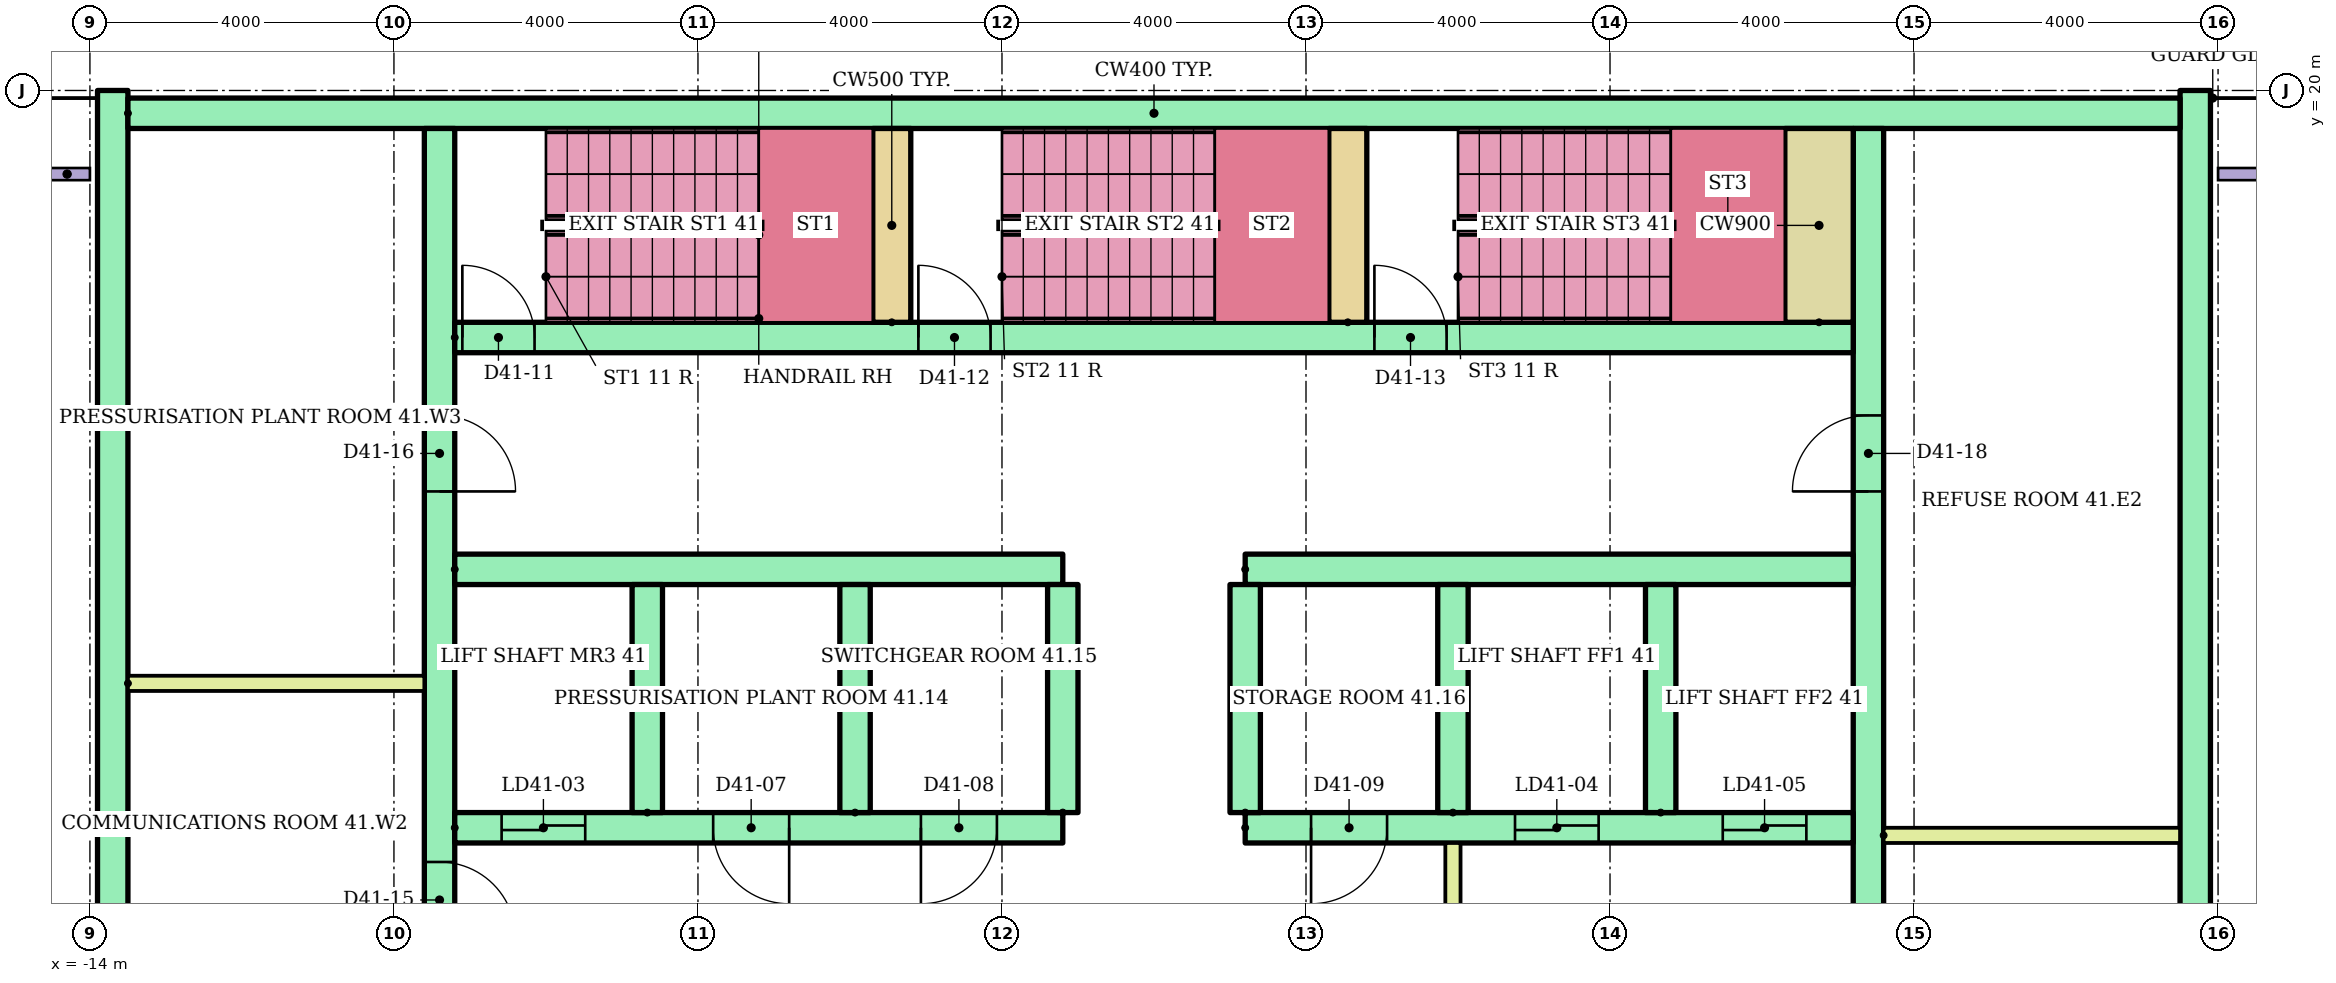
"""IFC4 building model, lengths in metres.
Left out: names, types, materials, properties, quantities, classifications, styles, units other than length and angle.
Written with IfcOpenShell. Run it as: python <this file> out.ifc"""

import sys

from ifc_helpers import new_model, si_unit, direction, frame, frame_2d, origin, place, context, subcontext, project, spatial, rectangle, extrude, element, fill, save


model = new_model("IFC4")
c1 = context("Model", 3, precision=1e-05, world=origin(), true_north=direction((0.0, 1.0)))
c2 = subcontext(c1, "Body", "Model", "MODEL_VIEW")
j1 = project(units=[si_unit("LENGTHUNIT", "METRE"), si_unit("PLANEANGLEUNIT", "RADIAN")], contexts=[c1])
p1 = place(None, origin())
s1 = spatial("IfcSite", under=j1, at=p1, CompositionType="ELEMENT")
p2 = place(p1, origin())
s2 = spatial("IfcBuilding", under=s1, at=p2, CompositionType="ELEMENT")
p3 = place(p2, frame((0.0, 0.0, 161.4)))
s3 = spatial("IfcBuildingStorey", under=s2, at=p3, CompositionType="ELEMENT", Elevation=161.4)
for number, where, z_axis, x_axis in (
    (1, (-13.7, 3.0, 0.0), (0.0, 0.0, 1.0), (0.0, 1.0, 0.0)),
    (2, (13.7, 3.0, 0.0), (0.0, 0.0, 1.0), (0.0, 1.0, 0.0)),
):
    element("IfcWall", number, at=place(p3, frame(where, z_axis=z_axis, x_axis=x_axis)), inside=s3, PredefinedType="SHEAR", context=c2, shape_type="SweptSolid", body=[
        extrude(rectangle(XDim=17.0, YDim=0.4, at=frame_2d((8.5, 0.0))), origin(), (0.0, 0.0, 1.0), 3.62),
    ])
p4 = place(p3, frame((-13.5, 19.7, 0.0)))
e3 = element("IfcWall", 3, at=p4, inside=s3, PredefinedType="SHEAR", context=c2, shape_type="SweptSolid", body=[
    extrude(rectangle(XDim=27.0, YDim=0.4, at=frame_2d((13.5, 0.0))), origin(), (0.0, 0.0, 1.0), 3.62),
])
p5 = place(p3, frame((-9.4, 6.8, 0.0), z_axis=(0.0, 0.0, 1.0), x_axis=(0.0, 1.0, 0.0)))
e4 = element("IfcWall", 4, at=p5, inside=s3, PredefinedType="SHEAR", context=c2, shape_type="SweptSolid", body=[
    extrude(rectangle(XDim=12.7, YDim=0.4, at=frame_2d((6.35, 0.0))), origin(), (0.0, 0.0, 1.0), 3.62),
])
p6 = place(p5, frame((0.3, 0.0, 0.0)))
e5 = element("IfcOpeningElement", 5, at=p6, cuts=e4, PredefinedType="OPENING", context=c2, shape_type="SweptSolid", body=[
    extrude(rectangle(XDim=1.0, YDim=2.1, at=frame_2d((0.5, 1.05))), frame((0.0, 0.21, 0.0), z_axis=(0.0, -1.0, 0.0), x_axis=(1.0, 0.0, 0.0)), (0.0, 0.0, 1.0), 0.42),
])
p7 = place(p5, frame((2.05, 0.0, 0.0)))
e6 = element("IfcOpeningElement", 6, at=p7, cuts=e4, PredefinedType="OPENING", context=c2, shape_type="SweptSolid", body=[
    extrude(rectangle(XDim=1.0, YDim=2.1, at=frame_2d((0.5, 1.05))), frame((0.0, 0.21, 0.0), z_axis=(0.0, -1.0, 0.0), x_axis=(1.0, 0.0, 0.0)), (0.0, 0.0, 1.0), 0.42),
])
p8 = place(p5, frame((7.925, 0.0, 0.0)))
e7 = element("IfcOpeningElement", 7, at=p8, cuts=e4, PredefinedType="OPENING", context=c2, shape_type="SweptSolid", body=[
    extrude(rectangle(XDim=1.0, YDim=2.1, at=frame_2d((0.5, 1.05))), frame((0.0, 0.21, 0.0), z_axis=(0.0, -1.0, 0.0), x_axis=(1.0, 0.0, 0.0)), (0.0, 0.0, 1.0), 0.42),
])
p9 = place(p3, frame((9.4, 6.8, 0.0), z_axis=(0.0, 0.0, 1.0), x_axis=(0.0, 1.0, 0.0)))
e8 = element("IfcWall", 8, at=p9, inside=s3, PredefinedType="SHEAR", context=c2, shape_type="SweptSolid", body=[
    extrude(rectangle(XDim=12.7, YDim=0.4, at=frame_2d((6.35, 0.0))), origin(), (0.0, 0.0, 1.0), 3.62),
])
p10 = place(p9, frame((1.15, 0.0, 0.0)))
e9 = element("IfcOpeningElement", 9, at=p10, cuts=e8, PredefinedType="OPENING", context=c2, shape_type="SweptSolid", body=[
    extrude(rectangle(XDim=1.0, YDim=2.1, at=frame_2d((0.5, 1.05))), frame((0.0, 0.21, 0.0), z_axis=(0.0, -1.0, 0.0), x_axis=(1.0, 0.0, 0.0)), (0.0, 0.0, 1.0), 0.42),
])
p11 = place(p9, frame((7.925, 0.0, 0.0)))
e10 = element("IfcOpeningElement", 10, at=p11, cuts=e8, PredefinedType="OPENING", context=c2, shape_type="SweptSolid", body=[
    extrude(rectangle(XDim=1.0, YDim=2.1, at=frame_2d((0.5, 1.05))), frame((0.0, 0.21, 0.0), z_axis=(0.0, -1.0, 0.0), x_axis=(1.0, 0.0, 0.0)), (0.0, 0.0, 1.0), 0.42),
])
p12 = place(p3, frame((-9.2, 10.3, 0.0)))
e11 = element("IfcWall", 11, at=p12, inside=s3, PredefinedType="SHEAR", context=c2, shape_type="SweptSolid", body=[
    extrude(rectangle(XDim=8.0, YDim=0.4, at=frame_2d((4.0, 0.0))), origin(), (0.0, 0.0, 1.0), 3.62),
])
p13 = place(p12, frame((0.617, 0.0, 0.0)))
e12 = element("IfcOpeningElement", 12, at=p13, cuts=e11, PredefinedType="OPENING", context=c2, shape_type="SweptSolid", body=[
    extrude(rectangle(XDim=1.1, YDim=2.1, at=frame_2d((0.55, 1.05))), frame((0.0, 0.21, 0.0), z_axis=(0.0, -1.0, 0.0), x_axis=(1.0, 0.0, 0.0)), (0.0, 0.0, 1.0), 0.42),
])
p14 = place(p12, frame((3.4, 0.0, 0.0)))
e13 = element("IfcOpeningElement", 13, at=p14, cuts=e11, PredefinedType="OPENING", context=c2, shape_type="SweptSolid", body=[
    extrude(rectangle(XDim=1.0, YDim=2.1, at=frame_2d((0.5, 1.05))), frame((0.0, 0.21, 0.0), z_axis=(0.0, -1.0, 0.0), x_axis=(1.0, 0.0, 0.0)), (0.0, 0.0, 1.0), 0.42),
])
p15 = place(p12, frame((6.133, 0.0, 0.0)))
e14 = element("IfcOpeningElement", 14, at=p15, cuts=e11, PredefinedType="OPENING", context=c2, shape_type="SweptSolid", body=[
    extrude(rectangle(XDim=1.0, YDim=2.1, at=frame_2d((0.5, 1.05))), frame((0.0, 0.21, 0.0), z_axis=(0.0, -1.0, 0.0), x_axis=(1.0, 0.0, 0.0)), (0.0, 0.0, 1.0), 0.42),
])
p16 = place(p3, frame((-9.2, 13.7, 0.0)))
e15 = element("IfcWall", 15, at=p16, inside=s3, PredefinedType="SHEAR", context=c2, shape_type="SweptSolid", body=[
    extrude(rectangle(XDim=8.0, YDim=0.4, at=frame_2d((4.0, 0.0))), origin(), (0.0, 0.0, 1.0), 3.62),
])
p17 = place(p3, frame((1.2, 10.3, 0.0)))
e16 = element("IfcWall", 16, at=p17, inside=s3, PredefinedType="SHEAR", context=c2, shape_type="SweptSolid", body=[
    extrude(rectangle(XDim=8.0, YDim=0.4, at=frame_2d((4.0, 0.0))), origin(), (0.0, 0.0, 1.0), 3.62),
])
p18 = place(p17, frame((3.55, 0.0, 0.0)))
e17 = element("IfcOpeningElement", 17, at=p18, cuts=e16, PredefinedType="OPENING", context=c2, shape_type="SweptSolid", body=[
    extrude(rectangle(XDim=1.1, YDim=2.1, at=frame_2d((0.55, 1.05))), frame((0.0, 0.21, 0.0), z_axis=(0.0, -1.0, 0.0), x_axis=(1.0, 0.0, 0.0)), (0.0, 0.0, 1.0), 0.42),
])
p19 = place(p17, frame((6.283, 0.0, 0.0)))
e18 = element("IfcOpeningElement", 18, at=p19, cuts=e16, PredefinedType="OPENING", context=c2, shape_type="SweptSolid", body=[
    extrude(rectangle(XDim=1.1, YDim=2.1, at=frame_2d((0.55, 1.05))), frame((0.0, 0.21, 0.0), z_axis=(0.0, -1.0, 0.0), x_axis=(1.0, 0.0, 0.0)), (0.0, 0.0, 1.0), 0.42),
])
p20 = place(p17, frame((0.867, 0.0, 0.0)))
e19 = element("IfcOpeningElement", 19, at=p20, cuts=e16, PredefinedType="OPENING", context=c2, shape_type="SweptSolid", body=[
    extrude(rectangle(XDim=1.0, YDim=2.1, at=frame_2d((0.5, 1.05))), frame((0.0, 0.21, 0.0), z_axis=(0.0, -1.0, 0.0), x_axis=(1.0, 0.0, 0.0)), (0.0, 0.0, 1.0), 0.42),
])
p21 = place(p3, frame((1.2, 13.7, 0.0)))
e20 = element("IfcWall", 20, at=p21, inside=s3, PredefinedType="SHEAR", context=c2, shape_type="SweptSolid", body=[
    extrude(rectangle(XDim=8.0, YDim=0.4, at=frame_2d((4.0, 0.0))), origin(), (0.0, 0.0, 1.0), 3.62),
])
for number, where, z_axis, x_axis in (
    (21, (-6.667, 10.5, 0.0), (0.0, 0.0, 1.0), (0.0, 1.0, 0.0)),
    (22, (-3.933, 10.5, 0.0), (0.0, 0.0, 1.0), (0.0, 1.0, 0.0)),
    (23, (-1.2, 10.5, 0.0), (0.0, 0.0, 1.0), (0.0, 1.0, 0.0)),
    (24, (1.2, 10.5, 0.0), (0.0, 0.0, 1.0), (0.0, 1.0, 0.0)),
    (25, (3.933, 10.5, 0.0), (0.0, 0.0, 1.0), (0.0, 1.0, 0.0)),
    (26, (6.667, 10.5, 0.0), (0.0, 0.0, 1.0), (0.0, 1.0, 0.0)),
):
    element("IfcWall", number, at=place(p3, frame(where, z_axis=z_axis, x_axis=x_axis)), inside=s3, PredefinedType="SHEAR", context=c2, shape_type="SweptSolid", body=[
        extrude(rectangle(XDim=3.0, YDim=0.4, at=frame_2d((1.5, 0.0))), origin(), (0.0, 0.0, 1.0), 3.62),
    ])
p22 = place(p3, frame((3.933, 6.8, 0.0), z_axis=(0.0, 0.0, 1.0), x_axis=(0.0, 1.0, 0.0)))
e27 = element("IfcWall", 27, at=p22, inside=s3, PredefinedType="PARTITIONING", context=c2, shape_type="SweptSolid", body=[
    extrude(rectangle(XDim=3.3, YDim=0.2, at=frame_2d((1.65, 0.0))), origin(), (0.0, 0.0, 1.0), 3.62),
])
p23 = place(p22, frame((1.1, 0.0, 0.0)))
e28 = element("IfcOpeningElement", 28, at=p23, cuts=e27, PredefinedType="OPENING", context=c2, shape_type="SweptSolid", body=[
    extrude(rectangle(XDim=1.1, YDim=2.1, at=frame_2d((0.55, 1.05))), frame((0.0, 0.11, 0.0), z_axis=(0.0, -1.0, 0.0), x_axis=(1.0, 0.0, 0.0)), (0.0, 0.0, 1.0), 0.22),
])
p24 = place(p3, frame((-9.2, 16.75, 0.0)))
e29 = element("IfcWall", 29, at=p24, inside=s3, PredefinedType="SHEAR", context=c2, shape_type="SweptSolid", body=[
    extrude(rectangle(XDim=18.4, YDim=0.4, at=frame_2d((9.2, 0.0))), origin(), (0.0, 0.0, 1.0), 3.62),
])
p25 = place(p24, frame((0.1, 0.0, 0.0)))
e30 = element("IfcOpeningElement", 30, at=p25, cuts=e29, PredefinedType="OPENING", context=c2, shape_type="SweptSolid", body=[
    extrude(rectangle(XDim=0.95, YDim=2.1, at=frame_2d((0.475, 1.05))), frame((0.0, 0.21, 0.0), z_axis=(0.0, -1.0, 0.0), x_axis=(1.0, 0.0, 0.0)), (0.0, 0.0, 1.0), 0.42),
])
p26 = place(p24, frame((6.1, 0.0, 0.0)))
e31 = element("IfcOpeningElement", 31, at=p26, cuts=e29, PredefinedType="OPENING", context=c2, shape_type="SweptSolid", body=[
    extrude(rectangle(XDim=0.95, YDim=2.1, at=frame_2d((0.475, 1.05))), frame((0.0, 0.21, 0.0), z_axis=(0.0, -1.0, 0.0), x_axis=(1.0, 0.0, 0.0)), (0.0, 0.0, 1.0), 0.42),
])
p27 = place(p24, frame((12.1, 0.0, 0.0)))
e32 = element("IfcOpeningElement", 32, at=p27, cuts=e29, PredefinedType="OPENING", context=c2, shape_type="SweptSolid", body=[
    extrude(rectangle(XDim=0.95, YDim=2.1, at=frame_2d((0.475, 1.05))), frame((0.0, 0.21, 0.0), z_axis=(0.0, -1.0, 0.0), x_axis=(1.0, 0.0, 0.0)), (0.0, 0.0, 1.0), 0.42),
])
for number, where, z_axis, x_axis in (
    (33, (-3.45, 16.95, 0.0), (0.0, 0.0, 1.0), (0.0, 1.0, 0.0)),
    (34, (2.55, 16.95, 0.0), (0.0, 0.0, 1.0), (0.0, 1.0, 0.0)),
):
    element("IfcWall", number, at=place(p3, frame(where, z_axis=z_axis, x_axis=x_axis)), inside=s3, PredefinedType="SHEAR", context=c2, shape_type="SweptSolid", body=[
        extrude(rectangle(XDim=2.55, YDim=0.5, at=frame_2d((1.275, 0.0))), origin(), (0.0, 0.0, 1.0), 3.62),
    ])
p28 = place(p3, frame((8.75, 16.95, 0.0), z_axis=(0.0, 0.0, 1.0), x_axis=(0.0, 1.0, 0.0)))
e35 = element("IfcWall", 35, at=p28, inside=s3, PredefinedType="SHEAR", context=c2, shape_type="SweptSolid", body=[
    extrude(rectangle(XDim=2.55, YDim=0.9, at=frame_2d((1.275, 0.0))), origin(), (0.0, 0.0, 1.0), 3.62),
])
for number, where in (
    (36, (-13.5, 12.2, 0.0)),
    (37, (9.6, 10.2, 0.0)),
):
    element("IfcWall", number, at=place(p3, frame(where)), inside=s3, PredefinedType="PARTITIONING", context=c2, shape_type="SweptSolid", body=[
        extrude(rectangle(XDim=3.9, YDim=0.2, at=frame_2d((1.95, 0.0))), origin(), (0.0, 0.0, 1.0), 3.62),
    ])
p29 = place(p13, origin())
e38 = element("IfcDoor", 38, at=p29, inside=s3, OperationType="SLIDING_TO_LEFT", PredefinedType="DOOR", context=c2, shape_type="SweptSolid", body=[
    extrude(rectangle(XDim=1.1, YDim=2.1, at=frame_2d((0.55, 1.05))), frame((0.0, 0.025, 0.0), z_axis=(0.0, -1.0, 0.0), x_axis=(1.0, 0.0, 0.0)), (0.0, 0.0, 1.0), 0.05),
])
fill(e12, e38)
p30 = place(p18, origin())
e39 = element("IfcDoor", 39, at=p30, inside=s3, OperationType="SLIDING_TO_LEFT", PredefinedType="DOOR", context=c2, shape_type="SweptSolid", body=[
    extrude(rectangle(XDim=1.1, YDim=2.1, at=frame_2d((0.55, 1.05))), frame((0.0, 0.025, 0.0), z_axis=(0.0, -1.0, 0.0), x_axis=(1.0, 0.0, 0.0)), (0.0, 0.0, 1.0), 0.05),
])
fill(e17, e39)
p31 = place(p19, origin())
e40 = element("IfcDoor", 40, at=p31, inside=s3, OperationType="SLIDING_TO_LEFT", PredefinedType="DOOR", context=c2, shape_type="SweptSolid", body=[
    extrude(rectangle(XDim=1.1, YDim=2.1, at=frame_2d((0.55, 1.05))), frame((0.0, 0.025, 0.0), z_axis=(0.0, -1.0, 0.0), x_axis=(1.0, 0.0, 0.0)), (0.0, 0.0, 1.0), 0.05),
])
fill(e18, e40)
p32 = place(p14, frame((1.0, 0.0, 0.0), z_axis=(0.0, 0.0, 1.0), x_axis=(-1.0, 0.0, 0.0)))
e41 = element("IfcDoor", 41, at=p32, inside=s3, OperationType="SINGLE_SWING_RIGHT", PredefinedType="DOOR", context=c2, shape_type="SweptSolid", body=[
    extrude(rectangle(XDim=1.0, YDim=2.1, at=frame_2d((0.5, 1.05))), frame((0.0, 0.025, 0.0), z_axis=(0.0, -1.0, 0.0), x_axis=(1.0, 0.0, 0.0)), (0.0, 0.0, 1.0), 0.05),
])
fill(e13, e41)
p33 = place(p15, frame((1.0, 0.0, 0.0), z_axis=(0.0, 0.0, 1.0), x_axis=(-1.0, 0.0, 0.0)))
e42 = element("IfcDoor", 42, at=p33, inside=s3, OperationType="SINGLE_SWING_LEFT", PredefinedType="DOOR", context=c2, shape_type="SweptSolid", body=[
    extrude(rectangle(XDim=1.0, YDim=2.1, at=frame_2d((0.5, 1.05))), frame((0.0, 0.025, 0.0), z_axis=(0.0, -1.0, 0.0), x_axis=(1.0, 0.0, 0.0)), (0.0, 0.0, 1.0), 0.05),
])
fill(e14, e42)
p34 = place(p20, frame((1.0, 0.0, 0.0), z_axis=(0.0, 0.0, 1.0), x_axis=(-1.0, 0.0, 0.0)))
e43 = element("IfcDoor", 43, at=p34, inside=s3, OperationType="SINGLE_SWING_LEFT", PredefinedType="DOOR", context=c2, shape_type="SweptSolid", body=[
    extrude(rectangle(XDim=1.0, YDim=2.1, at=frame_2d((0.5, 1.05))), frame((0.0, 0.025, 0.0), z_axis=(0.0, -1.0, 0.0), x_axis=(1.0, 0.0, 0.0)), (0.0, 0.0, 1.0), 0.05),
])
fill(e19, e43)
p35 = place(p25, origin())
e44 = element("IfcDoor", 44, at=p35, inside=s3, OperationType="SINGLE_SWING_LEFT", PredefinedType="DOOR", context=c2, shape_type="SweptSolid", body=[
    extrude(rectangle(XDim=0.95, YDim=2.1, at=frame_2d((0.475, 1.05))), frame((0.0, 0.025, 0.0), z_axis=(0.0, -1.0, 0.0), x_axis=(1.0, 0.0, 0.0)), (0.0, 0.0, 1.0), 0.05),
])
fill(e30, e44)
p36 = place(p26, origin())
e45 = element("IfcDoor", 45, at=p36, inside=s3, OperationType="SINGLE_SWING_LEFT", PredefinedType="DOOR", context=c2, shape_type="SweptSolid", body=[
    extrude(rectangle(XDim=0.95, YDim=2.1, at=frame_2d((0.475, 1.05))), frame((0.0, 0.025, 0.0), z_axis=(0.0, -1.0, 0.0), x_axis=(1.0, 0.0, 0.0)), (0.0, 0.0, 1.0), 0.05),
])
fill(e31, e45)
p37 = place(p27, origin())
e46 = element("IfcDoor", 46, at=p37, inside=s3, OperationType="SINGLE_SWING_LEFT", PredefinedType="DOOR", context=c2, shape_type="SweptSolid", body=[
    extrude(rectangle(XDim=0.95, YDim=2.1, at=frame_2d((0.475, 1.05))), frame((0.0, 0.025, 0.0), z_axis=(0.0, -1.0, 0.0), x_axis=(1.0, 0.0, 0.0)), (0.0, 0.0, 1.0), 0.05),
])
fill(e32, e46)
p38 = place(p7, frame((1.0, 0.0, 0.0), z_axis=(0.0, 0.0, 1.0), x_axis=(-1.0, 0.0, 0.0)))
e47 = element("IfcDoor", 47, at=p38, inside=s3, OperationType="SINGLE_SWING_LEFT", PredefinedType="DOOR", context=c2, shape_type="SweptSolid", body=[
    extrude(rectangle(XDim=1.0, YDim=2.1, at=frame_2d((0.5, 1.05))), frame((0.0, 0.025, 0.0), z_axis=(0.0, -1.0, 0.0), x_axis=(1.0, 0.0, 0.0)), (0.0, 0.0, 1.0), 0.05),
])
fill(e6, e47)
p39 = place(p8, frame((1.0, 0.0, 0.0), z_axis=(0.0, 0.0, 1.0), x_axis=(-1.0, 0.0, 0.0)))
e48 = element("IfcDoor", 48, at=p39, inside=s3, OperationType="SINGLE_SWING_LEFT", PredefinedType="DOOR", context=c2, shape_type="SweptSolid", body=[
    extrude(rectangle(XDim=1.0, YDim=2.1, at=frame_2d((0.5, 1.05))), frame((0.0, 0.025, 0.0), z_axis=(0.0, -1.0, 0.0), x_axis=(1.0, 0.0, 0.0)), (0.0, 0.0, 1.0), 0.05),
])
fill(e7, e48)
p40 = place(p11, origin())
e49 = element("IfcDoor", 49, at=p40, inside=s3, OperationType="SINGLE_SWING_LEFT", PredefinedType="DOOR", context=c2, shape_type="SweptSolid", body=[
    extrude(rectangle(XDim=1.0, YDim=2.1, at=frame_2d((0.5, 1.05))), frame((0.0, 0.025, 0.0), z_axis=(0.0, -1.0, 0.0), x_axis=(1.0, 0.0, 0.0)), (0.0, 0.0, 1.0), 0.05),
])
fill(e10, e49)
save(model, sys.argv[1])
